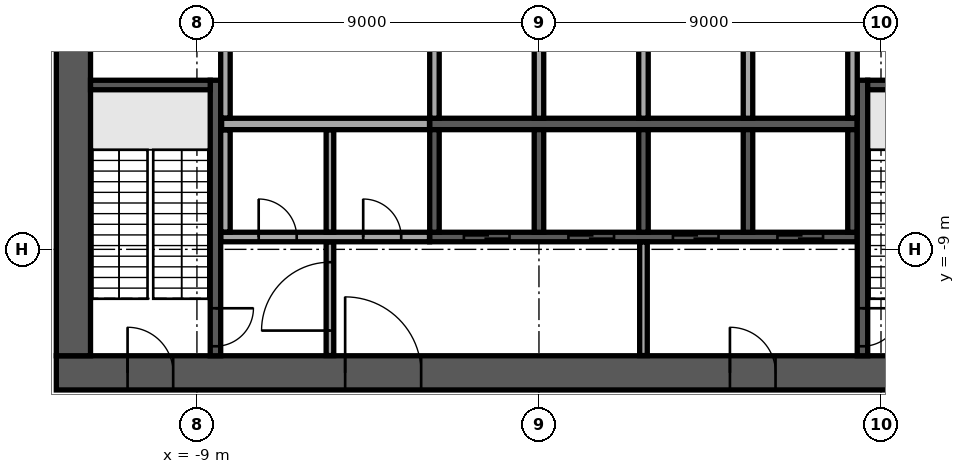
"""IFC4 building model, lengths in metres.
Left out: names, types, materials, properties, quantities, classifications, styles, units other than length and angle.
Written with IfcOpenShell. Run it as: python <this file> out.ifc"""

import sys

from ifc_helpers import new_model, si_unit, direction, frame, frame_2d, origin, place, context, subcontext, project, spatial, rectangle, extrude, element, fill, save


model = new_model("IFC4")
c1 = context("Model", 3, precision=1e-05, world=origin(), true_north=direction((0.0, 1.0)))
c2 = subcontext(c1, "Body", "Model", "MODEL_VIEW")
j1 = project(units=[si_unit("LENGTHUNIT", "METRE"), si_unit("PLANEANGLEUNIT", "RADIAN")], contexts=[c1])
p1 = place(None, origin())
s1 = spatial("IfcSite", under=j1, at=p1, CompositionType="ELEMENT")
p2 = place(p1, origin())
s2 = spatial("IfcBuilding", under=s1, at=p2, CompositionType="ELEMENT")
p3 = place(p2, frame((0.0, 0.0, 237.3)))
s3 = spatial("IfcBuildingStorey", under=s2, at=p3, CompositionType="ELEMENT", Elevation=237.3)
p4 = place(p3, frame((-12.7, -12.25, 0.0), z_axis=(0.0, 0.0, 1.0), x_axis=(1.0, 0.0, 0.0)))
e1 = element("IfcWall", 1, at=p4, inside=s3, PredefinedType="SHEAR", context=c2, shape_type="SweptSolid", body=[
    extrude(rectangle(XDim=25.4, YDim=0.9, at=frame_2d((12.7, 0.0))), origin(), (0.0, 0.0, 1.0), 5.24),
])
p5 = place(p4, frame((7.6, 0.0, 0.0)))
e2 = element("IfcOpeningElement", 2, at=p5, cuts=e1, PredefinedType="OPENING", context=c2, shape_type="SweptSolid", body=[
    extrude(rectangle(XDim=2.0, YDim=2.1, at=frame_2d((1.0, 1.05))), frame((0.0, 0.46, 0.0), z_axis=(0.0, -1.0, 0.0), x_axis=(1.0, 0.0, 0.0)), (0.0, 0.0, 1.0), 0.92),
])
p6 = place(p4, frame((17.725, 0.0, 0.0)))
e3 = element("IfcOpeningElement", 3, at=p6, cuts=e1, PredefinedType="OPENING", context=c2, shape_type="SweptSolid", body=[
    extrude(rectangle(XDim=1.2, YDim=2.1, at=frame_2d((0.6, 1.05))), frame((0.0, 0.46, 0.0), z_axis=(0.0, -1.0, 0.0), x_axis=(1.0, 0.0, 0.0)), (0.0, 0.0, 1.0), 0.92),
])
p7 = place(p4, frame((1.875, 0.0, 0.0)))
e4 = element("IfcOpeningElement", 4, at=p7, cuts=e1, PredefinedType="OPENING", context=c2, shape_type="SweptSolid", body=[
    extrude(rectangle(XDim=1.2, YDim=2.1, at=frame_2d((0.6, 1.05))), frame((0.0, 0.46, 0.0), z_axis=(0.0, -1.0, 0.0), x_axis=(1.0, 0.0, 0.0)), (0.0, 0.0, 1.0), 0.92),
])
p8 = place(p4, frame((22.325, 0.0, 0.0)))
e5 = element("IfcOpeningElement", 5, at=p8, cuts=e1, PredefinedType="OPENING", context=c2, shape_type="SweptSolid", body=[
    extrude(rectangle(XDim=1.2, YDim=2.1, at=frame_2d((0.6, 1.05))), frame((0.0, 0.46, 0.0), z_axis=(0.0, -1.0, 0.0), x_axis=(1.0, 0.0, 0.0)), (0.0, 0.0, 1.0), 0.92),
])
p9 = place(p3, frame((-12.25, -11.8, 0.0), z_axis=(0.0, 0.0, 1.0), x_axis=(0.0, 1.0, 0.0)))
e6 = element("IfcWall", 6, at=p9, inside=s3, PredefinedType="SHEAR", context=c2, shape_type="SweptSolid", body=[
    extrude(rectangle(XDim=23.6, YDim=0.9, at=frame_2d((11.8, 0.0))), origin(), (0.0, 0.0, 1.0), 5.24),
])
p10 = place(p9, frame((10.6, 0.0, 0.0)))
e7 = element("IfcOpeningElement", 7, at=p10, cuts=e6, PredefinedType="OPENING", context=c2, shape_type="SweptSolid", body=[
    extrude(rectangle(XDim=2.4, YDim=2.4, at=frame_2d((1.2, 1.2))), frame((0.0, 0.46, 0.0), z_axis=(0.0, -1.0, 0.0), x_axis=(1.0, 0.0, 0.0)), (0.0, 0.0, 1.0), 0.92),
])
p11 = place(p3, frame((-2.875, -5.7, 0.0), z_axis=(0.0, 0.0, 1.0), x_axis=(1.0, 0.0, 0.0)))
e8 = element("IfcWall", 8, at=p11, inside=s3, PredefinedType="SOLIDWALL", context=c2, shape_type="SweptSolid", body=[
    extrude(rectangle(XDim=11.25, YDim=0.3, at=frame_2d((5.625, 0.0))), origin(), (0.0, 0.0, 1.0), 5.24),
])
for number, where, z_axis, x_axis in (
    (9, (-2.75, -5.55, 0.0), (0.0, 0.0, 1.0), (0.0, 1.0, 0.0)),
    (10, (0.0, -5.55, 0.0), (0.0, 0.0, 1.0), (0.0, 1.0, 0.0)),
    (11, (2.75, -5.55, 0.0), (0.0, 0.0, 1.0), (0.0, 1.0, 0.0)),
    (12, (5.5, -5.55, 0.0), (0.0, 0.0, 1.0), (0.0, 1.0, 0.0)),
):
    element("IfcWall", number, at=place(p3, frame(where, z_axis=z_axis, x_axis=x_axis)), inside=s3, PredefinedType="SOLIDWALL", context=c2, shape_type="SweptSolid", body=[
        extrude(rectangle(XDim=2.7, YDim=0.25, at=frame_2d((1.35, 0.0))), origin(), (0.0, 0.0, 1.0), 5.24),
    ])
p12 = place(p3, frame((-2.875, -8.675, 0.0), z_axis=(0.0, 0.0, 1.0), x_axis=(1.0, 0.0, 0.0)))
e13 = element("IfcWall", 13, at=p12, inside=s3, PredefinedType="SOLIDWALL", context=c2, shape_type="SweptSolid", body=[
    extrude(rectangle(XDim=11.25, YDim=0.25, at=frame_2d((5.625, 0.0))), origin(), (0.0, 0.0, 1.0), 5.24),
])
p13 = place(p12, frame((0.9, 0.0, 0.0)))
e14 = element("IfcOpeningElement", 14, at=p13, cuts=e13, PredefinedType="OPENING", context=c2, shape_type="SweptSolid", body=[
    extrude(rectangle(XDim=1.2, YDim=2.1, at=frame_2d((0.6, 1.05))), frame((0.0, 0.135, 0.0), z_axis=(0.0, -1.0, 0.0), x_axis=(1.0, 0.0, 0.0)), (0.0, 0.0, 1.0), 0.27),
])
p14 = place(p12, frame((3.65, 0.0, 0.0)))
e15 = element("IfcOpeningElement", 15, at=p14, cuts=e13, PredefinedType="OPENING", context=c2, shape_type="SweptSolid", body=[
    extrude(rectangle(XDim=1.2, YDim=2.1, at=frame_2d((0.6, 1.05))), frame((0.0, 0.135, 0.0), z_axis=(0.0, -1.0, 0.0), x_axis=(1.0, 0.0, 0.0)), (0.0, 0.0, 1.0), 0.27),
])
p15 = place(p12, frame((6.4, 0.0, 0.0)))
e16 = element("IfcOpeningElement", 16, at=p15, cuts=e13, PredefinedType="OPENING", context=c2, shape_type="SweptSolid", body=[
    extrude(rectangle(XDim=1.2, YDim=2.1, at=frame_2d((0.6, 1.05))), frame((0.0, 0.135, 0.0), z_axis=(0.0, -1.0, 0.0), x_axis=(1.0, 0.0, 0.0)), (0.0, 0.0, 1.0), 0.27),
])
p16 = place(p12, frame((9.15, 0.0, 0.0)))
e17 = element("IfcOpeningElement", 17, at=p16, cuts=e13, PredefinedType="OPENING", context=c2, shape_type="SweptSolid", body=[
    extrude(rectangle(XDim=1.2, YDim=2.1, at=frame_2d((0.6, 1.05))), frame((0.0, 0.135, 0.0), z_axis=(0.0, -1.0, 0.0), x_axis=(1.0, 0.0, 0.0)), (0.0, 0.0, 1.0), 0.27),
])
for number, where, z_axis, x_axis in (
    (18, (-2.75, -8.55, 0.0), (0.0, 0.0, 1.0), (0.0, 1.0, 0.0)),
    (19, (0.0, -8.55, 0.0), (0.0, 0.0, 1.0), (0.0, 1.0, 0.0)),
    (20, (2.75, -8.55, 0.0), (0.0, 0.0, 1.0), (0.0, 1.0, 0.0)),
    (21, (5.5, -8.55, 0.0), (0.0, 0.0, 1.0), (0.0, 1.0, 0.0)),
    (22, (8.25, -8.55, 0.0), (0.0, 0.0, 1.0), (0.0, 1.0, 0.0)),
):
    element("IfcWall", number, at=place(p3, frame(where, z_axis=z_axis, x_axis=x_axis)), inside=s3, PredefinedType="SOLIDWALL", context=c2, shape_type="SweptSolid", body=[
        extrude(rectangle(XDim=2.7, YDim=0.25, at=frame_2d((1.35, 0.0))), origin(), (0.0, 0.0, 1.0), 5.24),
    ])
p17 = place(p3, frame((-8.512, -4.55, 0.0), z_axis=(0.0, 0.0, 1.0), x_axis=(0.0, -1.0, 0.0)))
e23 = element("IfcWall", 23, at=p17, inside=s3, PredefinedType="SOLIDWALL", context=c2, shape_type="SweptSolid", body=[
    extrude(rectangle(XDim=7.25, YDim=0.275, at=frame_2d((3.625, 0.0))), origin(), (0.0, 0.0, 1.0), 5.24),
])
p18 = place(p17, frame((6.0, 0.0, 0.0)))
e24 = element("IfcOpeningElement", 24, at=p18, cuts=e23, PredefinedType="OPENING", context=c2, shape_type="SweptSolid", body=[
    extrude(rectangle(XDim=1.0, YDim=2.1, at=frame_2d((0.5, 1.05))), frame((0.0, 0.147, 0.0), z_axis=(0.0, -1.0, 0.0), x_axis=(1.0, 0.0, 0.0)), (0.0, 0.0, 1.0), 0.295),
])
p19 = place(p3, frame((-8.65, -4.675, 0.0), z_axis=(0.0, 0.0, 1.0), x_axis=(-1.0, 0.0, 0.0)))
e25 = element("IfcWall", 25, at=p19, inside=s3, PredefinedType="SOLIDWALL", context=c2, shape_type="SweptSolid", body=[
    extrude(rectangle(XDim=3.15, YDim=0.25, at=frame_2d((1.575, 0.0))), origin(), (0.0, 0.0, 1.0), 5.24),
])
p20 = place(p3, frame((8.512, -4.55, 0.0), z_axis=(0.0, 0.0, 1.0), x_axis=(0.0, -1.0, 0.0)))
e26 = element("IfcWall", 26, at=p20, inside=s3, PredefinedType="SOLIDWALL", context=c2, shape_type="SweptSolid", body=[
    extrude(rectangle(XDim=7.25, YDim=0.275, at=frame_2d((3.625, 0.0))), origin(), (0.0, 0.0, 1.0), 5.24),
])
p21 = place(p20, frame((6.0, 0.0, 0.0)))
e27 = element("IfcOpeningElement", 27, at=p21, cuts=e26, PredefinedType="OPENING", context=c2, shape_type="SweptSolid", body=[
    extrude(rectangle(XDim=1.0, YDim=2.1, at=frame_2d((0.5, 1.05))), frame((0.0, 0.147, 0.0), z_axis=(0.0, -1.0, 0.0), x_axis=(1.0, 0.0, 0.0)), (0.0, 0.0, 1.0), 0.295),
])
p22 = place(p3, frame((8.65, -4.675, 0.0), z_axis=(0.0, 0.0, 1.0), x_axis=(1.0, 0.0, 0.0)))
e28 = element("IfcWall", 28, at=p22, inside=s3, PredefinedType="SOLIDWALL", context=c2, shape_type="SweptSolid", body=[
    extrude(rectangle(XDim=3.15, YDim=0.25, at=frame_2d((1.575, 0.0))), origin(), (0.0, 0.0, 1.0), 5.24),
])
p23 = place(p3, frame((-5.5, -11.795, 0.0), z_axis=(0.0, 0.0, 1.0), x_axis=(0.0, 1.0, 0.0)))
e29 = element("IfcWall", 29, at=p23, inside=s3, PredefinedType="PARTITIONING", context=c2, shape_type="SweptSolid", body=[
    extrude(rectangle(XDim=2.99, YDim=0.2, at=frame_2d((1.495, 0.0))), origin(), (0.0, 0.0, 1.0), 5.24),
])
p24 = place(p23, frame((0.657, 0.0, 0.0)))
e30 = element("IfcOpeningElement", 30, at=p24, cuts=e29, PredefinedType="OPENING", context=c2, shape_type="SweptSolid", body=[
    extrude(rectangle(XDim=1.8, YDim=2.1, at=frame_2d((0.9, 1.05))), frame((0.0, 0.11, 0.0), z_axis=(0.0, -1.0, 0.0), x_axis=(1.0, 0.0, 0.0)), (0.0, 0.0, 1.0), 0.22),
])
p25 = place(p3, frame((2.75, -11.795, 0.0), z_axis=(0.0, 0.0, 1.0), x_axis=(0.0, 1.0, 0.0)))
e31 = element("IfcWall", 31, at=p25, inside=s3, PredefinedType="PARTITIONING", context=c2, shape_type="SweptSolid", body=[
    extrude(rectangle(XDim=2.99, YDim=0.2, at=frame_2d((1.495, 0.0))), origin(), (0.0, 0.0, 1.0), 5.24),
])
p26 = place(p3, frame((-8.37, -8.675, 0.0), z_axis=(0.0, 0.0, 1.0), x_axis=(1.0, 0.0, 0.0)))
e32 = element("IfcWall", 32, at=p26, inside=s3, PredefinedType="PARTITIONING", context=c2, shape_type="SweptSolid", body=[
    extrude(rectangle(XDim=5.49, YDim=0.25, at=frame_2d((2.745, 0.0))), origin(), (0.0, 0.0, 1.0), 5.24),
])
p27 = place(p26, frame((0.995, 0.0, 0.0)))
e33 = element("IfcOpeningElement", 33, at=p27, cuts=e32, PredefinedType="OPENING", context=c2, shape_type="SweptSolid", body=[
    extrude(rectangle(XDim=1.0, YDim=2.1, at=frame_2d((0.5, 1.05))), frame((0.0, 0.135, 0.0), z_axis=(0.0, -1.0, 0.0), x_axis=(1.0, 0.0, 0.0)), (0.0, 0.0, 1.0), 0.27),
])
p28 = place(p26, frame((3.745, 0.0, 0.0)))
e34 = element("IfcOpeningElement", 34, at=p28, cuts=e32, PredefinedType="OPENING", context=c2, shape_type="SweptSolid", body=[
    extrude(rectangle(XDim=1.0, YDim=2.1, at=frame_2d((0.5, 1.05))), frame((0.0, 0.135, 0.0), z_axis=(0.0, -1.0, 0.0), x_axis=(1.0, 0.0, 0.0)), (0.0, 0.0, 1.0), 0.27),
])
p29 = place(p3, frame((-8.25, -8.545, 0.0), z_axis=(0.0, 0.0, 1.0), x_axis=(0.0, 1.0, 0.0)))
e35 = element("IfcWall", 35, at=p29, inside=s3, PredefinedType="PARTITIONING", context=c2, shape_type="SweptSolid", body=[
    extrude(rectangle(XDim=2.69, YDim=0.25, at=frame_2d((1.345, 0.0))), origin(), (0.0, 0.0, 1.0), 5.24),
])
p30 = place(p3, frame((-5.5, -8.545, 0.0), z_axis=(0.0, 0.0, 1.0), x_axis=(0.0, 1.0, 0.0)))
e36 = element("IfcWall", 36, at=p30, inside=s3, PredefinedType="PARTITIONING", context=c2, shape_type="SweptSolid", body=[
    extrude(rectangle(XDim=2.69, YDim=0.2, at=frame_2d((1.345, 0.0))), origin(), (0.0, 0.0, 1.0), 5.24),
])
p31 = place(p3, frame((-8.35, -5.7, 0.0), z_axis=(0.0, 0.0, 1.0), x_axis=(1.0, 0.0, 0.0)))
e37 = element("IfcWall", 37, at=p31, inside=s3, PredefinedType="PARTITIONING", context=c2, shape_type="SweptSolid", body=[
    extrude(rectangle(XDim=5.47, YDim=0.3, at=frame_2d((2.735, 0.0))), origin(), (0.0, 0.0, 1.0), 5.24),
])
for number, where, z_axis, x_axis in (
    (38, (-8.25, -5.545, 0.0), (0.0, 0.0, 1.0), (0.0, 1.0, 0.0)),
    (39, (8.25, -5.545, 0.0), (0.0, 0.0, 1.0), (0.0, 1.0, 0.0)),
):
    element("IfcWall", number, at=place(p3, frame(where, z_axis=z_axis, x_axis=x_axis)), inside=s3, PredefinedType="PARTITIONING", context=c2, shape_type="SweptSolid", body=[
        extrude(rectangle(XDim=2.69, YDim=0.25, at=frame_2d((1.345, 0.0))), origin(), (0.0, 0.0, 1.0), 5.24),
    ])
p32 = place(p3, frame((-33.651, -11.398, 0.0), z_axis=(0.0, 0.0, 1.0), x_axis=(0.788011466291, -0.61566056313, 0.0)))
e40 = element("IfcWall", 40, at=p32, inside=s3, PredefinedType="STANDARD", context=c2, shape_type="SweptSolid", body=[
    extrude(rectangle(XDim=39.0, YDim=0.6, at=frame_2d((19.5, 0.0))), origin(), (0.0, 0.0, 1.0), 5.24),
])
p33 = place(p32, frame((1.217, 0.0, 0.6)))
e41 = element("IfcOpeningElement", 41, at=p33, cuts=e40, PredefinedType="OPENING", context=c2, shape_type="SweptSolid", body=[
    extrude(rectangle(XDim=1.9, YDim=4.19, at=frame_2d((0.95, 2.095))), frame((0.0, 0.31, 0.0), z_axis=(0.0, -1.0, 0.0), x_axis=(1.0, 0.0, 0.0)), (0.0, 0.0, 1.0), 0.62),
])
p34 = place(p32, frame((5.55, 0.0, 0.6)))
e42 = element("IfcOpeningElement", 42, at=p34, cuts=e40, PredefinedType="OPENING", context=c2, shape_type="SweptSolid", body=[
    extrude(rectangle(XDim=1.9, YDim=4.19, at=frame_2d((0.95, 2.095))), frame((0.0, 0.31, 0.0), z_axis=(0.0, -1.0, 0.0), x_axis=(1.0, 0.0, 0.0)), (0.0, 0.0, 1.0), 0.62),
])
p35 = place(p32, frame((18.55, 0.0, 0.6)))
e43 = element("IfcOpeningElement", 43, at=p35, cuts=e40, PredefinedType="OPENING", context=c2, shape_type="SweptSolid", body=[
    extrude(rectangle(XDim=1.9, YDim=4.19, at=frame_2d((0.95, 2.095))), frame((0.0, 0.31, 0.0), z_axis=(0.0, -1.0, 0.0), x_axis=(1.0, 0.0, 0.0)), (0.0, 0.0, 1.0), 0.62),
])
p36 = place(p32, frame((22.883, 0.0, 0.6)))
e44 = element("IfcOpeningElement", 44, at=p36, cuts=e40, PredefinedType="OPENING", context=c2, shape_type="SweptSolid", body=[
    extrude(rectangle(XDim=1.9, YDim=4.19, at=frame_2d((0.95, 2.095))), frame((0.0, 0.31, 0.0), z_axis=(0.0, -1.0, 0.0), x_axis=(1.0, 0.0, 0.0)), (0.0, 0.0, 1.0), 0.62),
])
p37 = place(p32, frame((31.55, 0.0, 0.6)))
e45 = element("IfcOpeningElement", 45, at=p37, cuts=e40, PredefinedType="OPENING", context=c2, shape_type="SweptSolid", body=[
    extrude(rectangle(XDim=1.9, YDim=4.19, at=frame_2d((0.95, 2.095))), frame((0.0, 0.31, 0.0), z_axis=(0.0, -1.0, 0.0), x_axis=(1.0, 0.0, 0.0)), (0.0, 0.0, 1.0), 0.62),
])
p38 = place(p32, frame((35.883, 0.0, 0.6)))
e46 = element("IfcOpeningElement", 46, at=p38, cuts=e40, PredefinedType="OPENING", context=c2, shape_type="SweptSolid", body=[
    extrude(rectangle(XDim=1.9, YDim=4.19, at=frame_2d((0.95, 2.095))), frame((0.0, 0.31, 0.0), z_axis=(0.0, -1.0, 0.0), x_axis=(1.0, 0.0, 0.0)), (0.0, 0.0, 1.0), 0.62),
])
p39 = place(p5, origin())
e47 = element("IfcDoor", 47, at=p39, inside=s3, OperationType="SINGLE_SWING_LEFT", PredefinedType="DOOR", context=c2, shape_type="SweptSolid", body=[
    extrude(rectangle(XDim=2.0, YDim=2.1, at=frame_2d((1.0, 1.05))), frame((0.0, 0.025, 0.0), z_axis=(0.0, -1.0, 0.0), x_axis=(1.0, 0.0, 0.0)), (0.0, 0.0, 1.0), 0.05),
])
fill(e2, e47)
p40 = place(p6, origin())
e48 = element("IfcDoor", 48, at=p40, inside=s3, OperationType="SINGLE_SWING_LEFT", PredefinedType="DOOR", context=c2, shape_type="SweptSolid", body=[
    extrude(rectangle(XDim=1.2, YDim=2.1, at=frame_2d((0.6, 1.05))), frame((0.0, 0.025, 0.0), z_axis=(0.0, -1.0, 0.0), x_axis=(1.0, 0.0, 0.0)), (0.0, 0.0, 1.0), 0.05),
])
fill(e3, e48)
p41 = place(p7, origin())
e49 = element("IfcDoor", 49, at=p41, inside=s3, OperationType="SINGLE_SWING_LEFT", PredefinedType="DOOR", context=c2, shape_type="SweptSolid", body=[
    extrude(rectangle(XDim=1.2, YDim=2.1, at=frame_2d((0.6, 1.05))), frame((0.0, 0.025, 0.0), z_axis=(0.0, -1.0, 0.0), x_axis=(1.0, 0.0, 0.0)), (0.0, 0.0, 1.0), 0.05),
])
fill(e4, e49)
p42 = place(p13, origin())
e50 = element("IfcDoor", 50, at=p42, inside=s3, OperationType="DOUBLE_DOOR_SLIDING", PredefinedType="DOOR", context=c2, shape_type="SweptSolid", body=[
    extrude(rectangle(XDim=1.2, YDim=2.1, at=frame_2d((0.6, 1.05))), frame((0.0, 0.025, 0.0), z_axis=(0.0, -1.0, 0.0), x_axis=(1.0, 0.0, 0.0)), (0.0, 0.0, 1.0), 0.05),
])
fill(e14, e50)
p43 = place(p14, origin())
e51 = element("IfcDoor", 51, at=p43, inside=s3, OperationType="DOUBLE_DOOR_SLIDING", PredefinedType="DOOR", context=c2, shape_type="SweptSolid", body=[
    extrude(rectangle(XDim=1.2, YDim=2.1, at=frame_2d((0.6, 1.05))), frame((0.0, 0.025, 0.0), z_axis=(0.0, -1.0, 0.0), x_axis=(1.0, 0.0, 0.0)), (0.0, 0.0, 1.0), 0.05),
])
fill(e15, e51)
p44 = place(p15, origin())
e52 = element("IfcDoor", 52, at=p44, inside=s3, OperationType="DOUBLE_DOOR_SLIDING", PredefinedType="DOOR", context=c2, shape_type="SweptSolid", body=[
    extrude(rectangle(XDim=1.2, YDim=2.1, at=frame_2d((0.6, 1.05))), frame((0.0, 0.025, 0.0), z_axis=(0.0, -1.0, 0.0), x_axis=(1.0, 0.0, 0.0)), (0.0, 0.0, 1.0), 0.05),
])
fill(e16, e52)
p45 = place(p16, origin())
e53 = element("IfcDoor", 53, at=p45, inside=s3, OperationType="DOUBLE_DOOR_SLIDING", PredefinedType="DOOR", context=c2, shape_type="SweptSolid", body=[
    extrude(rectangle(XDim=1.2, YDim=2.1, at=frame_2d((0.6, 1.05))), frame((0.0, 0.025, 0.0), z_axis=(0.0, -1.0, 0.0), x_axis=(1.0, 0.0, 0.0)), (0.0, 0.0, 1.0), 0.05),
])
fill(e17, e53)
p46 = place(p18, origin())
e54 = element("IfcDoor", 54, at=p46, inside=s3, OperationType="SINGLE_SWING_LEFT", PredefinedType="DOOR", context=c2, shape_type="SweptSolid", body=[
    extrude(rectangle(XDim=1.0, YDim=2.1, at=frame_2d((0.5, 1.05))), frame((0.0, 0.025, 0.0), z_axis=(0.0, -1.0, 0.0), x_axis=(1.0, 0.0, 0.0)), (0.0, 0.0, 1.0), 0.05),
])
fill(e24, e54)
p47 = place(p21, origin())
e55 = element("IfcDoor", 55, at=p47, inside=s3, OperationType="SINGLE_SWING_LEFT", PredefinedType="DOOR", context=c2, shape_type="SweptSolid", body=[
    extrude(rectangle(XDim=1.0, YDim=2.1, at=frame_2d((0.5, 1.05))), frame((0.0, 0.025, 0.0), z_axis=(0.0, -1.0, 0.0), x_axis=(1.0, 0.0, 0.0)), (0.0, 0.0, 1.0), 0.05),
])
fill(e27, e55)
p48 = place(p27, origin())
e56 = element("IfcDoor", 56, at=p48, inside=s3, OperationType="SINGLE_SWING_LEFT", PredefinedType="DOOR", context=c2, shape_type="SweptSolid", body=[
    extrude(rectangle(XDim=1.0, YDim=2.1, at=frame_2d((0.5, 1.05))), frame((0.0, 0.025, 0.0), z_axis=(0.0, -1.0, 0.0), x_axis=(1.0, 0.0, 0.0)), (0.0, 0.0, 1.0), 0.05),
])
fill(e33, e56)
p49 = place(p28, origin())
e57 = element("IfcDoor", 57, at=p49, inside=s3, OperationType="SINGLE_SWING_LEFT", PredefinedType="DOOR", context=c2, shape_type="SweptSolid", body=[
    extrude(rectangle(XDim=1.0, YDim=2.1, at=frame_2d((0.5, 1.05))), frame((0.0, 0.025, 0.0), z_axis=(0.0, -1.0, 0.0), x_axis=(1.0, 0.0, 0.0)), (0.0, 0.0, 1.0), 0.05),
])
fill(e34, e57)
p50 = place(p24, origin())
e58 = element("IfcDoor", 58, at=p50, inside=s3, OperationType="SINGLE_SWING_LEFT", PredefinedType="DOOR", context=c2, shape_type="SweptSolid", body=[
    extrude(rectangle(XDim=1.8, YDim=2.1, at=frame_2d((0.9, 1.05))), frame((0.0, 0.025, 0.0), z_axis=(0.0, -1.0, 0.0), x_axis=(1.0, 0.0, 0.0)), (0.0, 0.0, 1.0), 0.05),
])
fill(e30, e58)
save(model, sys.argv[1])
